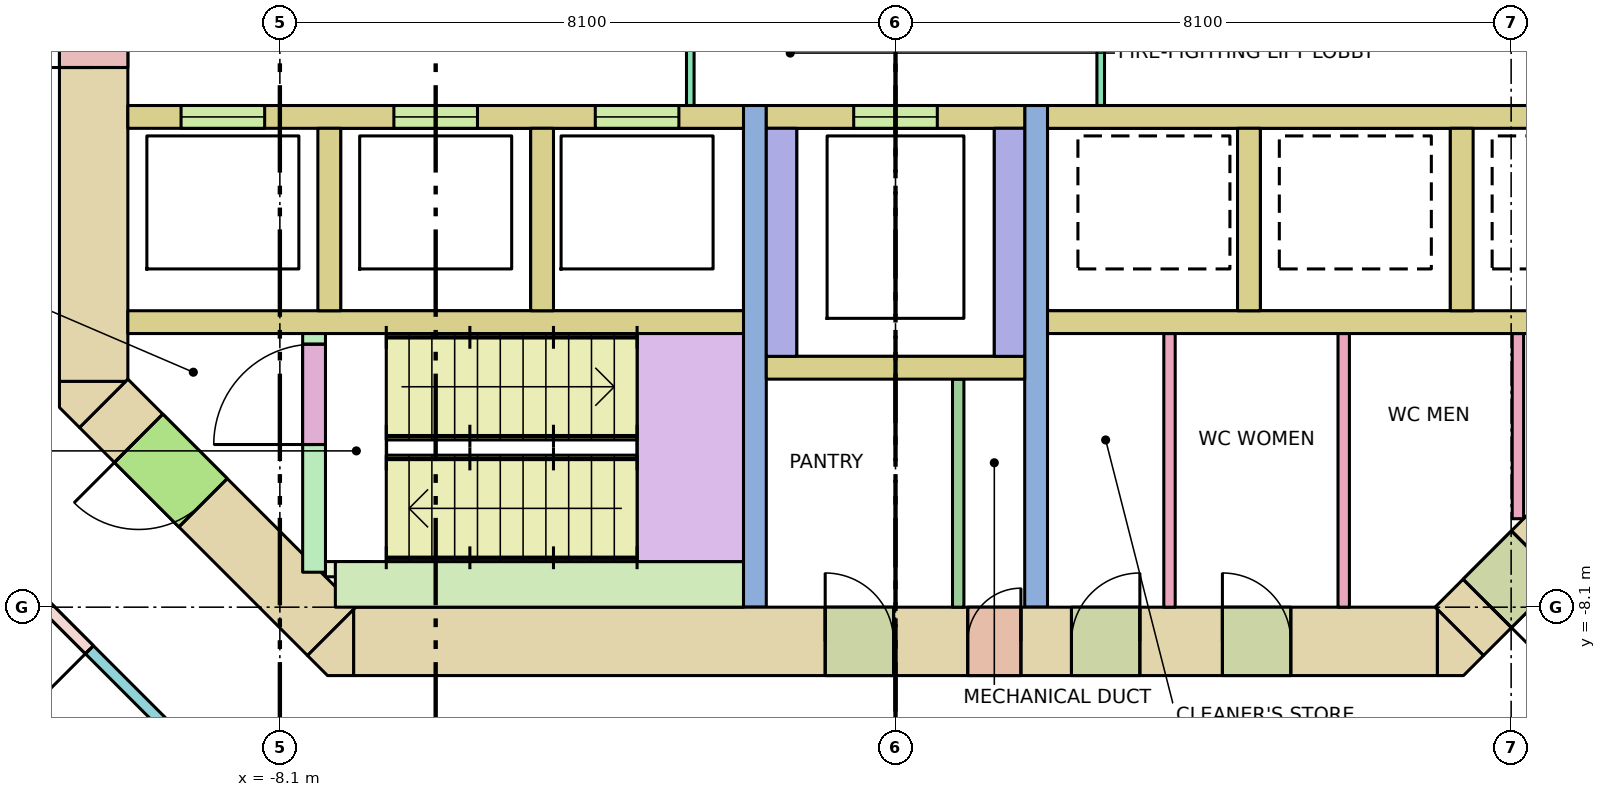
"""IFC4 building model, lengths in metres.
Left out: names, types, materials, properties, quantities, classifications, styles, units other than length and angle.
Written with IfcOpenShell. Run it as: python <this file> out.ifc"""

import sys

from ifc_helpers import new_model, si_unit, direction, frame, frame_2d, origin, place, context, subcontext, project, spatial, polyline, rectangle, outline, extrude, element, fill, save


model = new_model("IFC4")
c1 = context("Model", 3, precision=1e-05, world=origin(), true_north=direction((0.0, 1.0)))
c2 = subcontext(c1, "Body", "Model", "MODEL_VIEW")
j1 = project(units=[si_unit("LENGTHUNIT", "METRE"), si_unit("PLANEANGLEUNIT", "RADIAN")], contexts=[c1])
p1 = place(None, origin())
s1 = spatial("IfcSite", under=j1, at=p1, CompositionType="ELEMENT")
p2 = place(p1, origin())
s2 = spatial("IfcBuilding", under=s1, at=p2, CompositionType="ELEMENT")
p3 = place(p2, frame((0.0, 0.0, 59.0)))
s3 = spatial("IfcBuildingStorey", under=s2, at=p3, CompositionType="ELEMENT", Elevation=59.0)
p4 = place(p3, frame((-7.13, -8.55, -0.28), z_axis=(0.0, 0.0, 1.0), x_axis=(1.0, 0.0, 0.0)))
e1 = element("IfcWall", 1, at=p4, inside=s3, PredefinedType="SHEAR", context=c2, shape_type="SweptSolid", body=[
    extrude(rectangle(XDim=14.26, YDim=0.9, at=frame_2d((7.13, 0.0))), origin(), (0.0, 0.0, 1.0), 4.0),
])
p5 = place(p4, frame((8.08, 0.0, 0.28)))
e2 = element("IfcOpeningElement", 2, at=p5, cuts=e1, PredefinedType="OPENING", context=c2, shape_type="SweptSolid", body=[
    extrude(rectangle(XDim=0.7, YDim=2.1, at=frame_2d((0.35, 1.05))), frame((0.0, 0.46, 0.0), z_axis=(0.0, -1.0, 0.0), x_axis=(1.0, 0.0, 0.0)), (0.0, 0.0, 1.0), 0.92),
])
p6 = place(p4, frame((6.205, 0.0, 0.28)))
e3 = element("IfcOpeningElement", 3, at=p6, cuts=e1, PredefinedType="OPENING", context=c2, shape_type="SweptSolid", body=[
    extrude(rectangle(XDim=0.9, YDim=2.1, at=frame_2d((0.45, 1.05))), frame((0.0, 0.46, 0.0), z_axis=(0.0, -1.0, 0.0), x_axis=(1.0, 0.0, 0.0)), (0.0, 0.0, 1.0), 0.92),
])
p7 = place(p4, frame((9.445, 0.0, 0.28)))
e4 = element("IfcOpeningElement", 4, at=p7, cuts=e1, PredefinedType="OPENING", context=c2, shape_type="SweptSolid", body=[
    extrude(rectangle(XDim=0.9, YDim=2.1, at=frame_2d((0.45, 1.05))), frame((0.0, 0.46, 0.0), z_axis=(0.0, -1.0, 0.0), x_axis=(1.0, 0.0, 0.0)), (0.0, 0.0, 1.0), 0.92),
])
p8 = place(p4, frame((11.431, 0.0, 0.28)))
e5 = element("IfcOpeningElement", 5, at=p8, cuts=e1, PredefinedType="OPENING", context=c2, shape_type="SweptSolid", body=[
    extrude(rectangle(XDim=0.9, YDim=2.1, at=frame_2d((0.45, 1.05))), frame((0.0, 0.46, 0.0), z_axis=(0.0, -1.0, 0.0), x_axis=(1.0, 0.0, 0.0)), (0.0, 0.0, 1.0), 0.92),
])
p9 = place(p3, frame((-10.55, -5.13, -0.28), z_axis=(0.0, 0.0, 1.0), x_axis=(0.0, 1.0, 0.0)))
e6 = element("IfcWall", 6, at=p9, inside=s3, PredefinedType="SHEAR", context=c2, shape_type="SweptSolid", body=[
    extrude(rectangle(XDim=10.26, YDim=0.9, at=frame_2d((5.13, 0.0))), origin(), (0.0, 0.0, 1.0), 4.0),
])
p10 = place(p9, frame((4.13, 0.0, 0.28)))
e7 = element("IfcOpeningElement", 7, at=p10, cuts=e6, PredefinedType="OPENING", context=c2, shape_type="SweptSolid", body=[
    extrude(rectangle(XDim=2.0, YDim=2.1, at=frame_2d((1.0, 1.05))), frame((0.0, 0.46, 0.0), z_axis=(0.0, -1.0, 0.0), x_axis=(1.0, 0.0, 0.0)), (0.0, 0.0, 1.0), 0.92),
])
p11 = place(p3, frame((10.418, -5.418, -0.28), z_axis=(0.0, 0.0, 1.0), x_axis=(-0.707106781187, -0.707106781187, 0.0)))
e8 = element("IfcWall", 8, at=p11, inside=s3, PredefinedType="SHEAR", context=c2, shape_type="SweptSolid", body=[
    extrude(rectangle(XDim=4.243, YDim=0.9, at=frame_2d((2.121, 0.0))), origin(), (0.0, 0.0, 1.0), 4.0),
])
p12 = place(p11, frame((2.823, 0.0, 0.28)))
e9 = element("IfcOpeningElement", 9, at=p12, cuts=e8, PredefinedType="OPENING", context=c2, shape_type="SweptSolid", body=[
    extrude(rectangle(XDim=0.9, YDim=2.1, at=frame_2d((0.45, 1.05))), frame((0.0, 0.46, 0.0), z_axis=(0.0, -1.0, 0.0), x_axis=(1.0, 0.0, 0.0)), (0.0, 0.0, 1.0), 0.92),
])
p13 = place(p11, frame((0.52, 0.0, 0.28)))
e10 = element("IfcOpeningElement", 10, at=p13, cuts=e8, PredefinedType="OPENING", context=c2, shape_type="SweptSolid", body=[
    extrude(rectangle(XDim=0.9, YDim=2.1, at=frame_2d((0.45, 1.05))), frame((0.0, 0.46, 0.0), z_axis=(0.0, -1.0, 0.0), x_axis=(1.0, 0.0, 0.0)), (0.0, 0.0, 1.0), 0.92),
])
p14 = place(p3, frame((-7.418, -8.418, -0.28), z_axis=(0.0, 0.0, 1.0), x_axis=(-0.707106781187, 0.707106781187, 0.0)))
e11 = element("IfcWall", 11, at=p14, inside=s3, PredefinedType="SHEAR", context=c2, shape_type="SweptSolid", body=[
    extrude(rectangle(XDim=4.243, YDim=0.9, at=frame_2d((2.121, 0.0))), origin(), (0.0, 0.0, 1.0), 4.0),
])
p15 = place(p14, frame((2.393, 0.0, 0.28)))
e12 = element("IfcOpeningElement", 12, at=p15, cuts=e11, PredefinedType="OPENING", context=c2, shape_type="SweptSolid", body=[
    extrude(rectangle(XDim=1.2, YDim=2.1, at=frame_2d((0.6, 1.05))), frame((0.0, 0.46, 0.0), z_axis=(0.0, -1.0, 0.0), x_axis=(1.0, 0.0, 0.0)), (0.0, 0.0, 1.0), 0.92),
])
p16 = place(p3, frame((0.0, 0.0, -0.28)))
e13 = element("IfcWall", 13, at=p16, inside=s3, PredefinedType="SHEAR", context=c2, shape_type="SweptSolid", body=[
    extrude(outline(polyline([(-7.473, -9.0), (-7.736, -8.736), (-7.13, -8.13), (-7.13, -9.0), (-7.473, -9.0)])), origin(), (0.0, 0.0, 1.0), 4.0),
])
p17 = place(p3, frame((0.0, 0.0, -0.28)))
e14 = element("IfcWall", 14, at=p17, inside=s3, PredefinedType="SHEAR", context=c2, shape_type="SweptSolid", body=[
    extrude(outline(polyline([(7.473, -9.0), (7.13, -9.0), (7.13, -8.13), (7.736, -8.736), (7.473, -9.0)])), origin(), (0.0, 0.0, 1.0), 4.0),
])
p18 = place(p3, frame((0.0, 0.0, -0.28)))
e15 = element("IfcWall", 15, at=p18, inside=s3, PredefinedType="SHEAR", context=c2, shape_type="SweptSolid", body=[
    extrude(outline(polyline([(-11.0, -5.473), (-11.0, -5.13), (-10.13, -5.13), (-10.736, -5.736), (-11.0, -5.473)])), origin(), (0.0, 0.0, 1.0), 4.0),
])
for number, where, z_axis, x_axis in (
    (16, (-10.1, -4.35, 0.0), (0.0, 0.0, 1.0), (1.0, 0.0, 0.0)),
    (17, (2.0, -4.35, 0.0), (0.0, 0.0, 1.0), (1.0, 0.0, 0.0)),
):
    element("IfcWall", number, at=place(p3, frame(where, z_axis=z_axis, x_axis=x_axis)), inside=s3, PredefinedType="SOLIDWALL", context=c2, shape_type="SweptSolid", body=[
        extrude(rectangle(XDim=8.1, YDim=0.3, at=frame_2d((4.05, 0.0))), origin(), (0.0, 0.0, 1.0), 3.72),
    ])
p19 = place(p3, frame((-10.1, -1.65, 0.0), z_axis=(0.0, 0.0, 1.0), x_axis=(1.0, 0.0, 0.0)))
e18 = element("IfcWall", 18, at=p19, inside=s3, PredefinedType="SOLIDWALL", context=c2, shape_type="SweptSolid", body=[
    extrude(rectangle(XDim=8.1, YDim=0.3, at=frame_2d((4.05, 0.0))), origin(), (0.0, 0.0, 1.0), 3.72),
])
p20 = place(p19, frame((0.7, 0.0, 0.0)))
e19 = element("IfcOpeningElement", 19, at=p20, cuts=e18, PredefinedType="OPENING", context=c2, shape_type="SweptSolid", body=[
    extrude(rectangle(XDim=1.1, YDim=2.1, at=frame_2d((0.55, 1.05))), frame((0.0, 0.16, 0.0), z_axis=(0.0, -1.0, 0.0), x_axis=(1.0, 0.0, 0.0)), (0.0, 0.0, 1.0), 0.32),
])
p21 = place(p19, frame((3.5, 0.0, 0.0)))
e20 = element("IfcOpeningElement", 20, at=p21, cuts=e18, PredefinedType="OPENING", context=c2, shape_type="SweptSolid", body=[
    extrude(rectangle(XDim=1.1, YDim=2.1, at=frame_2d((0.55, 1.05))), frame((0.0, 0.16, 0.0), z_axis=(0.0, -1.0, 0.0), x_axis=(1.0, 0.0, 0.0)), (0.0, 0.0, 1.0), 0.32),
])
p22 = place(p19, frame((6.15, 0.0, 0.0)))
e21 = element("IfcOpeningElement", 21, at=p22, cuts=e18, PredefinedType="OPENING", context=c2, shape_type="SweptSolid", body=[
    extrude(rectangle(XDim=1.1, YDim=2.1, at=frame_2d((0.55, 1.05))), frame((0.0, 0.16, 0.0), z_axis=(0.0, -1.0, 0.0), x_axis=(1.0, 0.0, 0.0)), (0.0, 0.0, 1.0), 0.32),
])
p23 = place(p3, frame((2.0, -1.65, 0.0), z_axis=(0.0, 0.0, 1.0), x_axis=(1.0, 0.0, 0.0)))
e22 = element("IfcWall", 22, at=p23, inside=s3, PredefinedType="SOLIDWALL", context=c2, shape_type="SweptSolid", body=[
    extrude(rectangle(XDim=8.1, YDim=0.3, at=frame_2d((4.05, 0.0))), origin(), (0.0, 0.0, 1.0), 3.72),
])
for number, where, z_axis, x_axis in (
    (23, (-7.45, -4.2, 0.0), (0.0, 0.0, 1.0), (0.0, 1.0, 0.0)),
    (24, (-4.65, -4.2, 0.0), (0.0, 0.0, 1.0), (0.0, 1.0, 0.0)),
    (25, (4.65, -4.2, 0.0), (0.0, 0.0, 1.0), (0.0, 1.0, 0.0)),
    (26, (7.45, -4.2, 0.0), (0.0, 0.0, 1.0), (0.0, 1.0, 0.0)),
):
    element("IfcWall", number, at=place(p3, frame(where, z_axis=z_axis, x_axis=x_axis)), inside=s3, PredefinedType="SOLIDWALL", context=c2, shape_type="SweptSolid", body=[
        extrude(rectangle(XDim=2.4, YDim=0.3, at=frame_2d((1.2, 0.0))), origin(), (0.0, 0.0, 1.0), 3.72),
    ])
for number, where, z_axis, x_axis in (
    (27, (-1.85, -8.1, 0.0), (0.0, 0.0, 1.0), (0.0, 1.0, 0.0)),
    (28, (1.85, -8.1, 0.0), (0.0, 0.0, 1.0), (0.0, 1.0, 0.0)),
):
    element("IfcWall", number, at=place(p3, frame(where, z_axis=z_axis, x_axis=x_axis)), inside=s3, PredefinedType="SHEAR", context=c2, shape_type="SweptSolid", body=[
        extrude(rectangle(XDim=6.6, YDim=0.3, at=frame_2d((3.3, 0.0))), origin(), (0.0, 0.0, 1.0), 3.72),
    ])
p24 = place(p3, frame((-1.7, -1.65, 0.0), z_axis=(0.0, 0.0, 1.0), x_axis=(1.0, 0.0, 0.0)))
e29 = element("IfcWall", 29, at=p24, inside=s3, PredefinedType="SOLIDWALL", context=c2, shape_type="SweptSolid", body=[
    extrude(rectangle(XDim=3.4, YDim=0.3, at=frame_2d((1.7, 0.0))), origin(), (0.0, 0.0, 1.0), 3.72),
])
p25 = place(p24, frame((1.15, 0.0, 0.0)))
e30 = element("IfcOpeningElement", 30, at=p25, cuts=e29, PredefinedType="OPENING", context=c2, shape_type="SweptSolid", body=[
    extrude(rectangle(XDim=1.1, YDim=2.1, at=frame_2d((0.55, 1.05))), frame((0.0, 0.16, 0.0), z_axis=(0.0, -1.0, 0.0), x_axis=(1.0, 0.0, 0.0)), (0.0, 0.0, 1.0), 0.32),
])
for number, where, z_axis, x_axis in (
    (31, (-1.5, -4.8, 0.0), (0.0, 0.0, 1.0), (0.0, 1.0, 0.0)),
    (32, (1.5, -4.8, 0.0), (0.0, 0.0, 1.0), (0.0, 1.0, 0.0)),
):
    element("IfcWall", number, at=place(p3, frame(where, z_axis=z_axis, x_axis=x_axis)), inside=s3, PredefinedType="SOLIDWALL", context=c2, shape_type="SweptSolid", body=[
        extrude(rectangle(XDim=3.0, YDim=0.4, at=frame_2d((1.5, 0.0))), origin(), (0.0, 0.0, 1.0), 3.72),
    ])
p26 = place(p3, frame((-1.7, -4.95, 0.0), z_axis=(0.0, 0.0, 1.0), x_axis=(1.0, 0.0, 0.0)))
e33 = element("IfcWall", 33, at=p26, inside=s3, PredefinedType="SOLIDWALL", context=c2, shape_type="SweptSolid", body=[
    extrude(rectangle(XDim=3.4, YDim=0.3, at=frame_2d((1.7, 0.0))), origin(), (0.0, 0.0, 1.0), 3.72),
])
p27 = place(p3, frame((-7.65, -7.64, 0.0), z_axis=(0.0, 0.0, 1.0), x_axis=(0.0, 1.0, 0.0)))
e34 = element("IfcWall", 34, at=p27, inside=s3, PredefinedType="SHEAR", context=c2, shape_type="SweptSolid", body=[
    extrude(rectangle(XDim=3.14, YDim=0.3, at=frame_2d((1.57, 0.0))), origin(), (0.0, 0.0, 1.0), 3.72),
])
p28 = place(p27, frame((1.68, 0.0, 0.0)))
e35 = element("IfcOpeningElement", 35, at=p28, cuts=e34, PredefinedType="OPENING", context=c2, shape_type="SweptSolid", body=[
    extrude(rectangle(XDim=1.32, YDim=2.1, at=frame_2d((0.66, 1.05))), frame((0.0, 0.16, 0.0), z_axis=(0.0, -1.0, 0.0), x_axis=(1.0, 0.0, 0.0)), (0.0, 0.0, 1.0), 0.32),
])
p29 = place(p3, frame((-7.5, -7.6, 0.0), z_axis=(0.0, 0.0, 1.0), x_axis=(1.0, 0.0, 0.0)))
e36 = element("IfcWall", 36, at=p29, inside=s3, PredefinedType="SHEAR", context=c2, shape_type="SweptSolid", body=[
    extrude(rectangle(XDim=0.6, YDim=0.2, at=frame_2d((0.3, 0.0))), origin(), (0.0, 0.0, 1.0), 3.72),
])
p30 = place(p3, frame((-7.37, -7.8, 0.0), z_axis=(0.0, 0.0, 1.0), x_axis=(1.0, 0.0, 0.0)))
e37 = element("IfcWall", 37, at=p30, inside=s3, PredefinedType="SHEAR", context=c2, shape_type="SweptSolid", body=[
    extrude(rectangle(XDim=5.37, YDim=0.6, at=frame_2d((2.685, 0.0))), origin(), (0.0, 0.0, 1.0), 3.72),
])
p31 = place(p3, frame((-2.7, -1.5, 0.0), z_axis=(0.0, 0.0, 1.0), x_axis=(0.0, 1.0, 0.0)))
e38 = element("IfcWall", 38, at=p31, inside=s3, PredefinedType="PARTITIONING", context=c2, shape_type="SweptSolid", body=[
    extrude(rectangle(XDim=3.0, YDim=0.1, at=frame_2d((1.5, 0.0))), origin(), (0.0, 0.0, 1.0), 3.72),
])
p32 = place(p31, frame((0.9, 0.0, 0.0)))
e39 = element("IfcOpeningElement", 39, at=p32, cuts=e38, PredefinedType="OPENING", context=c2, shape_type="SweptSolid", body=[
    extrude(rectangle(XDim=1.2, YDim=2.1, at=frame_2d((0.6, 1.05))), frame((0.0, 0.06, 0.0), z_axis=(0.0, -1.0, 0.0), x_axis=(1.0, 0.0, 0.0)), (0.0, 0.0, 1.0), 0.12),
])
p33 = place(p3, frame((2.7, -1.5, 0.0), z_axis=(0.0, 0.0, 1.0), x_axis=(0.0, 1.0, 0.0)))
e40 = element("IfcWall", 40, at=p33, inside=s3, PredefinedType="PARTITIONING", context=c2, shape_type="SweptSolid", body=[
    extrude(rectangle(XDim=3.0, YDim=0.1, at=frame_2d((1.5, 0.0))), origin(), (0.0, 0.0, 1.0), 3.72),
])
p34 = place(p33, frame((0.9, 0.0, 0.0)))
e41 = element("IfcOpeningElement", 41, at=p34, cuts=e40, PredefinedType="OPENING", context=c2, shape_type="SweptSolid", body=[
    extrude(rectangle(XDim=1.2, YDim=2.1, at=frame_2d((0.6, 1.05))), frame((0.0, 0.06, 0.0), z_axis=(0.0, -1.0, 0.0), x_axis=(1.0, 0.0, 0.0)), (0.0, 0.0, 1.0), 0.12),
])
p35 = place(p3, frame((0.825, -8.1, 0.0), z_axis=(0.0, 0.0, 1.0), x_axis=(0.0, 1.0, 0.0)))
e42 = element("IfcWall", 42, at=p35, inside=s3, PredefinedType="PARTITIONING", context=c2, shape_type="SweptSolid", body=[
    extrude(rectangle(XDim=3.0, YDim=0.15, at=frame_2d((1.5, 0.0))), origin(), (0.0, 0.0, 1.0), 3.72),
])
for number, where, z_axis, x_axis in (
    (43, (3.605, -8.1, 0.0), (0.0, 0.0, 1.0), (0.0, 1.0, 0.0)),
    (44, (5.897, -8.1, 0.0), (0.0, 0.0, 1.0), (0.0, 1.0, 0.0)),
):
    element("IfcWall", number, at=place(p3, frame(where, z_axis=z_axis, x_axis=x_axis)), inside=s3, PredefinedType="PARTITIONING", context=c2, shape_type="SweptSolid", body=[
        extrude(rectangle(XDim=3.6, YDim=0.15, at=frame_2d((1.8, 0.0))), origin(), (0.0, 0.0, 1.0), 3.72),
    ])
p36 = place(p3, frame((8.189, -6.936, 0.0), z_axis=(0.0, 0.0, 1.0), x_axis=(0.0, 1.0, 0.0)))
e45 = element("IfcWall", 45, at=p36, inside=s3, PredefinedType="PARTITIONING", context=c2, shape_type="SweptSolid", body=[
    extrude(rectangle(XDim=2.436, YDim=0.15, at=frame_2d((1.218, 0.0))), origin(), (0.0, 0.0, 1.0), 3.72),
])
p37 = place(p3, frame((12.938, -6.328, 0.0), z_axis=(0.0, 0.0, 1.0), x_axis=(-0.707088206597, -0.707125355289, 0.0)))
e46 = element("IfcWall", 46, at=p37, inside=s3, PredefinedType="PARTITIONING", context=c2, shape_type="SweptSolid", body=[
    extrude(rectangle(XDim=6.572, YDim=0.15, at=frame_2d((3.286, 0.0))), origin(), (0.0, 0.0, 1.0), 2.82),
])
p38 = place(p37, frame((2.398, 0.0, 0.0)))
e47 = element("IfcOpeningElement", 47, at=p38, cuts=e46, PredefinedType="OPENING", context=c2, shape_type="SweptSolid", body=[
    extrude(rectangle(XDim=0.9, YDim=2.1, at=frame_2d((0.45, 1.05))), frame((0.0, 0.085, 0.0), z_axis=(0.0, -1.0, 0.0), x_axis=(1.0, 0.0, 0.0)), (0.0, 0.0, 1.0), 0.17),
])
p39 = place(p3, frame((-8.291, -10.975, 0.0), z_axis=(0.0, 0.0, 1.0), x_axis=(-0.707106781187, 0.707106781187, 0.0)))
e48 = element("IfcWall", 48, at=p39, inside=s3, PredefinedType="PARTITIONING", context=c2, shape_type="SweptSolid", body=[
    extrude(rectangle(XDim=6.624, YDim=0.15, at=frame_2d((3.312, 0.0))), origin(), (0.0, 0.0, 1.0), 2.82),
])
p40 = place(p39, frame((3.274, 0.0, 0.0)))
e49 = element("IfcOpeningElement", 49, at=p40, cuts=e48, PredefinedType="OPENING", context=c2, shape_type="SweptSolid", body=[
    extrude(rectangle(XDim=0.9, YDim=2.1, at=frame_2d((0.45, 1.05))), frame((0.0, 0.085, 0.0), z_axis=(0.0, -1.0, 0.0), x_axis=(1.0, 0.0, 0.0)), (0.0, 0.0, 1.0), 0.17),
])
p41 = place(p20, origin())
e50 = element("IfcDoor", 50, at=p41, inside=s3, OperationType="DOUBLE_DOOR_SLIDING", PredefinedType="DOOR", context=c2, shape_type="SweptSolid", body=[
    extrude(rectangle(XDim=1.1, YDim=2.1, at=frame_2d((0.55, 1.05))), frame((0.0, 0.025, 0.0), z_axis=(0.0, -1.0, 0.0), x_axis=(1.0, 0.0, 0.0)), (0.0, 0.0, 1.0), 0.05),
])
fill(e19, e50)
p42 = place(p21, origin())
e51 = element("IfcDoor", 51, at=p42, inside=s3, OperationType="DOUBLE_DOOR_SLIDING", PredefinedType="DOOR", context=c2, shape_type="SweptSolid", body=[
    extrude(rectangle(XDim=1.1, YDim=2.1, at=frame_2d((0.55, 1.05))), frame((0.0, 0.025, 0.0), z_axis=(0.0, -1.0, 0.0), x_axis=(1.0, 0.0, 0.0)), (0.0, 0.0, 1.0), 0.05),
])
fill(e20, e51)
p43 = place(p22, origin())
e52 = element("IfcDoor", 52, at=p43, inside=s3, OperationType="DOUBLE_DOOR_SLIDING", PredefinedType="DOOR", context=c2, shape_type="SweptSolid", body=[
    extrude(rectangle(XDim=1.1, YDim=2.1, at=frame_2d((0.55, 1.05))), frame((0.0, 0.025, 0.0), z_axis=(0.0, -1.0, 0.0), x_axis=(1.0, 0.0, 0.0)), (0.0, 0.0, 1.0), 0.05),
])
fill(e21, e52)
p44 = place(p25, origin())
e53 = element("IfcDoor", 53, at=p44, inside=s3, OperationType="DOUBLE_DOOR_SLIDING", PredefinedType="DOOR", context=c2, shape_type="SweptSolid", body=[
    extrude(rectangle(XDim=1.1, YDim=2.1, at=frame_2d((0.55, 1.05))), frame((0.0, 0.025, 0.0), z_axis=(0.0, -1.0, 0.0), x_axis=(1.0, 0.0, 0.0)), (0.0, 0.0, 1.0), 0.05),
])
fill(e30, e53)
p45 = place(p28, origin())
e54 = element("IfcDoor", 54, at=p45, inside=s3, OperationType="DOUBLE_DOOR_SINGLE_SWING", PredefinedType="DOOR", context=c2, shape_type="SweptSolid", body=[
    extrude(rectangle(XDim=1.32, YDim=2.1, at=frame_2d((0.66, 1.05))), frame((0.0, 0.025, 0.0), z_axis=(0.0, -1.0, 0.0), x_axis=(1.0, 0.0, 0.0)), (0.0, 0.0, 1.0), 0.05),
])
fill(e35, e54)
p46 = place(p15, origin())
e55 = element("IfcDoor", 55, at=p46, inside=s3, OperationType="SINGLE_SWING_RIGHT", PredefinedType="DOOR", context=c2, shape_type="SweptSolid", body=[
    extrude(rectangle(XDim=1.2, YDim=2.1, at=frame_2d((0.6, 1.05))), frame((0.0, 0.025, 0.0), z_axis=(0.0, -1.0, 0.0), x_axis=(1.0, 0.0, 0.0)), (0.0, 0.0, 1.0), 0.05),
])
fill(e12, e55)
p47 = place(p10, origin())
e56 = element("IfcDoor", 56, at=p47, inside=s3, OperationType="DOUBLE_DOOR_SINGLE_SWING", PredefinedType="DOOR", context=c2, shape_type="SweptSolid", body=[
    extrude(rectangle(XDim=2.0, YDim=2.1, at=frame_2d((1.0, 1.05))), frame((0.0, 0.025, 0.0), z_axis=(0.0, -1.0, 0.0), x_axis=(1.0, 0.0, 0.0)), (0.0, 0.0, 1.0), 0.05),
])
fill(e7, e56)
p48 = place(p5, origin())
e57 = element("IfcDoor", 57, at=p48, inside=s3, OperationType="SINGLE_SWING_RIGHT", PredefinedType="DOOR", context=c2, shape_type="SweptSolid", body=[
    extrude(rectangle(XDim=0.7, YDim=2.1, at=frame_2d((0.35, 1.05))), frame((0.0, 0.025, 0.0), z_axis=(0.0, -1.0, 0.0), x_axis=(1.0, 0.0, 0.0)), (0.0, 0.0, 1.0), 0.05),
])
fill(e2, e57)
p49 = place(p6, origin())
e58 = element("IfcDoor", 58, at=p49, inside=s3, OperationType="SINGLE_SWING_LEFT", PredefinedType="DOOR", context=c2, shape_type="SweptSolid", body=[
    extrude(rectangle(XDim=0.9, YDim=2.1, at=frame_2d((0.45, 1.05))), frame((0.0, 0.025, 0.0), z_axis=(0.0, -1.0, 0.0), x_axis=(1.0, 0.0, 0.0)), (0.0, 0.0, 1.0), 0.05),
])
fill(e3, e58)
p50 = place(p7, origin())
e59 = element("IfcDoor", 59, at=p50, inside=s3, OperationType="SINGLE_SWING_RIGHT", PredefinedType="DOOR", context=c2, shape_type="SweptSolid", body=[
    extrude(rectangle(XDim=0.9, YDim=2.1, at=frame_2d((0.45, 1.05))), frame((0.0, 0.025, 0.0), z_axis=(0.0, -1.0, 0.0), x_axis=(1.0, 0.0, 0.0)), (0.0, 0.0, 1.0), 0.05),
])
fill(e4, e59)
p51 = place(p8, origin())
e60 = element("IfcDoor", 60, at=p51, inside=s3, OperationType="SINGLE_SWING_LEFT", PredefinedType="DOOR", context=c2, shape_type="SweptSolid", body=[
    extrude(rectangle(XDim=0.9, YDim=2.1, at=frame_2d((0.45, 1.05))), frame((0.0, 0.025, 0.0), z_axis=(0.0, -1.0, 0.0), x_axis=(1.0, 0.0, 0.0)), (0.0, 0.0, 1.0), 0.05),
])
fill(e5, e60)
p52 = place(p12, origin())
e61 = element("IfcDoor", 61, at=p52, inside=s3, OperationType="SINGLE_SWING_RIGHT", PredefinedType="DOOR", context=c2, shape_type="SweptSolid", body=[
    extrude(rectangle(XDim=0.9, YDim=2.1, at=frame_2d((0.45, 1.05))), frame((0.0, 0.025, 0.0), z_axis=(0.0, -1.0, 0.0), x_axis=(1.0, 0.0, 0.0)), (0.0, 0.0, 1.0), 0.05),
])
fill(e9, e61)
p53 = place(p40, origin())
e62 = element("IfcDoor", 62, at=p53, inside=s3, OperationType="SINGLE_SWING_LEFT", PredefinedType="DOOR", context=c2, shape_type="SweptSolid", body=[
    extrude(rectangle(XDim=0.9, YDim=2.1, at=frame_2d((0.45, 1.05))), frame((0.0, 0.025, 0.0), z_axis=(0.0, -1.0, 0.0), x_axis=(1.0, 0.0, 0.0)), (0.0, 0.0, 1.0), 0.05),
])
fill(e49, e62)
save(model, sys.argv[1])
